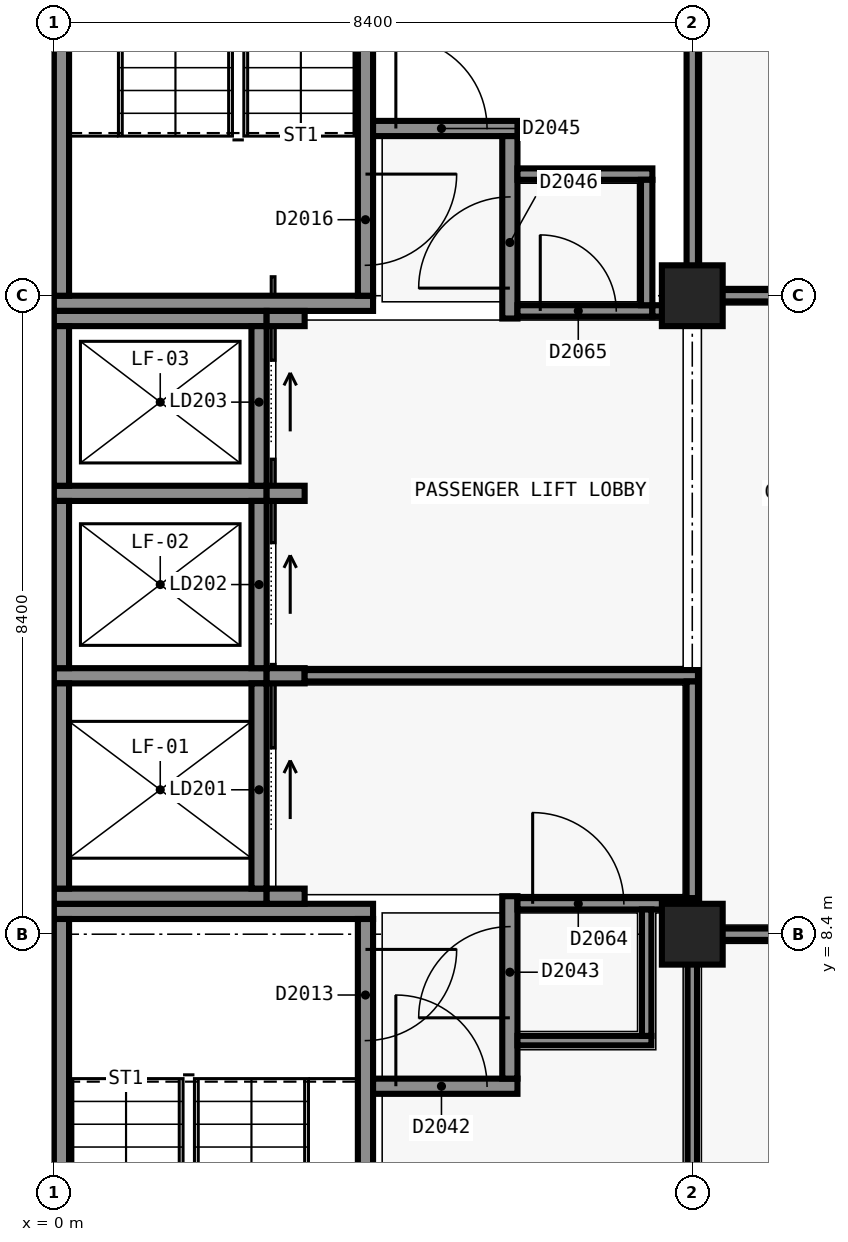
"""IFC4 building model, lengths in metres.
Left out: names, types, materials, properties, quantities, classifications, styles, units other than length and angle.
Written with IfcOpenShell. Run it as: python <this file> out.ifc"""

import sys

from ifc_helpers import new_model, si_unit, direction, frame, frame_2d, origin, origin_2d, place, context, subcontext, project, spatial, rectangle, extrude, element, fill, save


model = new_model("IFC4")
c1 = context("Model", 3, precision=1e-05, world=origin(), true_north=direction((0.0, 1.0)))
c2 = subcontext(c1, "Body", "Model", "MODEL_VIEW")
j1 = project(units=[si_unit("LENGTHUNIT", "METRE"), si_unit("PLANEANGLEUNIT", "RADIAN")], contexts=[c1])
p1 = place(None, origin())
s1 = spatial("IfcSite", under=j1, at=p1, CompositionType="ELEMENT")
p2 = place(p1, origin())
s2 = spatial("IfcBuilding", under=s1, at=p2, CompositionType="ELEMENT")
p3 = place(p2, frame((0.0, 0.0, 10.2)))
s3 = spatial("IfcBuildingStorey", under=s2, at=p3, CompositionType="ELEMENT", Elevation=10.2)
p4 = place(p3, frame((0.0, 8.7, 0.0), z_axis=(0.0, 0.0, 1.0), x_axis=(1.0, 0.0, 0.0)))
e1 = element("IfcWall", 1, at=p4, inside=s3, PredefinedType="SHEAR", context=c2, shape_type="SweptSolid", body=[
    extrude(rectangle(XDim=4.199, YDim=0.2, at=frame_2d((2.1, 0.0))), origin(), (0.0, 0.0, 1.0), 4.8),
])
p5 = place(p3, frame((0.1, 0.2, 0.0), z_axis=(0.0, 0.0, 1.0), x_axis=(0.0, 1.0, 0.0)))
e2 = element("IfcWall", 2, at=p5, inside=s3, PredefinedType="SHEAR", context=c2, shape_type="SweptSolid", body=[
    extrude(rectangle(XDim=8.4, YDim=0.2, at=frame_2d((4.2, 0.0))), origin(), (0.0, 0.0, 1.0), 4.8),
])
p6 = place(p3, frame((4.1, 8.6, 0.0), z_axis=(0.0, 0.0, 1.0), x_axis=(0.0, -1.0, 0.0)))
e3 = element("IfcWall", 3, at=p6, inside=s3, PredefinedType="SHEAR", context=c2, shape_type="SweptSolid", body=[
    extrude(rectangle(XDim=8.4, YDim=0.2, at=frame_2d((4.2, 0.0))), origin(), (0.0, 0.0, 1.0), 4.8),
])
p7 = place(p6, frame((0.4, 0.0, 0.0)))
e4 = element("IfcOpeningElement", 4, at=p7, cuts=e3, PredefinedType="OPENING", context=c2, shape_type="SweptSolid", body=[
    extrude(rectangle(XDim=1.2, YDim=2.1, at=frame_2d((0.6, 1.05))), frame((0.0, 0.11, 0.0), z_axis=(0.0, -1.0, 0.0), x_axis=(1.0, 0.0, 0.0)), (0.0, 0.0, 1.0), 0.22),
])
p8 = place(p3, frame((4.2, 16.7, 0.0), z_axis=(0.0, 0.0, 1.0), x_axis=(-1.0, 0.0, 0.0)))
e5 = element("IfcWall", 5, at=p8, inside=s3, PredefinedType="SHEAR", context=c2, shape_type="SweptSolid", body=[
    extrude(rectangle(XDim=4.199, YDim=0.2, at=frame_2d((2.1, 0.0))), origin(), (0.0, 0.0, 1.0), 4.8),
])
p9 = place(p3, frame((0.1, 16.8, 0.0), z_axis=(0.0, 0.0, 1.0), x_axis=(0.0, 1.0, 0.0)))
e6 = element("IfcWall", 6, at=p9, inside=s3, PredefinedType="SHEAR", context=c2, shape_type="SweptSolid", body=[
    extrude(rectangle(XDim=8.2, YDim=0.2, at=frame_2d((4.1, 0.0))), origin(), (0.0, 0.0, 1.0), 4.8),
])
p10 = place(p3, frame((4.1, 25.0, 0.0), z_axis=(0.0, 0.0, 1.0), x_axis=(0.0, -1.0, 0.0)))
e7 = element("IfcWall", 7, at=p10, inside=s3, PredefinedType="SHEAR", context=c2, shape_type="SweptSolid", body=[
    extrude(rectangle(XDim=8.2, YDim=0.2, at=frame_2d((4.1, 0.0))), origin(), (0.0, 0.0, 1.0), 4.8),
])
p11 = place(p10, frame((6.6, 0.0, 0.0)))
e8 = element("IfcOpeningElement", 8, at=p11, cuts=e7, PredefinedType="OPENING", context=c2, shape_type="SweptSolid", body=[
    extrude(rectangle(XDim=1.2, YDim=2.1, at=frame_2d((0.6, 1.05))), frame((0.0, 0.11, 0.0), z_axis=(0.0, -1.0, 0.0), x_axis=(1.0, 0.0, 0.0)), (0.0, 0.0, 1.0), 0.22),
])
for number, where, z_axis, x_axis in (
    (9, (2.8, 8.9, 0.0), (0.0, 0.0, 1.0), (-1.0, 0.0, 0.0)),
    (10, (0.0, 11.8, 0.0), (0.0, 0.0, 1.0), (1.0, 0.0, 0.0)),
):
    element("IfcWall", number, at=place(p3, frame(where, z_axis=z_axis, x_axis=x_axis)), inside=s3, PredefinedType="SHEAR", context=c2, shape_type="SweptSolid", body=[
        extrude(rectangle(XDim=2.8, YDim=0.2, at=frame_2d((1.4, 0.0))), origin(), (0.0, 0.0, 1.0), 4.8),
    ])
p12 = place(p3, frame((0.1, 9.0, 0.0), z_axis=(0.0, 0.0, 1.0), x_axis=(0.0, 1.0, 0.0)))
e11 = element("IfcWall", 11, at=p12, inside=s3, PredefinedType="SHEAR", context=c2, shape_type="SweptSolid", body=[
    extrude(rectangle(XDim=2.7, YDim=0.2, at=frame_2d((1.35, 0.0))), origin(), (0.0, 0.0, 1.0), 4.8),
])
p13 = place(p3, frame((2.7, 11.7, 0.0), z_axis=(0.0, 0.0, 1.0), x_axis=(0.0, -1.0, 0.0)))
e12 = element("IfcWall", 12, at=p13, inside=s3, PredefinedType="SHEAR", context=c2, shape_type="SweptSolid", body=[
    extrude(rectangle(XDim=2.7, YDim=0.2, at=frame_2d((1.35, 0.0))), origin(), (0.0, 0.0, 1.0), 4.8),
])
p14 = place(p13, frame((0.85, 0.0, 0.0)))
e13 = element("IfcOpeningElement", 13, at=p14, cuts=e12, PredefinedType="OPENING", context=c2, shape_type="SweptSolid", body=[
    extrude(rectangle(XDim=1.1, YDim=2.1, at=frame_2d((0.55, 1.05))), frame((0.0, 0.11, 0.0), z_axis=(0.0, -1.0, 0.0), x_axis=(1.0, 0.0, 0.0)), (0.0, 0.0, 1.0), 0.22),
])
p15 = place(p3, frame((0.0, 14.2, 0.0), z_axis=(0.0, 0.0, 1.0), x_axis=(1.0, 0.0, 0.0)))
e14 = element("IfcWall", 14, at=p15, inside=s3, PredefinedType="SHEAR", context=c2, shape_type="SweptSolid", body=[
    extrude(rectangle(XDim=2.8, YDim=0.2, at=frame_2d((1.4, 0.0))), origin(), (0.0, 0.0, 1.0), 4.8),
])
p16 = place(p3, frame((0.1, 11.9, 0.0), z_axis=(0.0, 0.0, 1.0), x_axis=(0.0, 1.0, 0.0)))
e15 = element("IfcWall", 15, at=p16, inside=s3, PredefinedType="SHEAR", context=c2, shape_type="SweptSolid", body=[
    extrude(rectangle(XDim=2.2, YDim=0.2, at=frame_2d((1.1, 0.0))), origin(), (0.0, 0.0, 1.0), 4.8),
])
p17 = place(p3, frame((2.7, 14.1, 0.0), z_axis=(0.0, 0.0, 1.0), x_axis=(0.0, -1.0, 0.0)))
e16 = element("IfcWall", 16, at=p17, inside=s3, PredefinedType="SHEAR", context=c2, shape_type="SweptSolid", body=[
    extrude(rectangle(XDim=2.2, YDim=0.2, at=frame_2d((1.1, 0.0))), origin(), (0.0, 0.0, 1.0), 4.8),
])
p18 = place(p17, frame((0.55, 0.0, 0.0)))
e17 = element("IfcOpeningElement", 17, at=p18, cuts=e16, PredefinedType="OPENING", context=c2, shape_type="SweptSolid", body=[
    extrude(rectangle(XDim=1.1, YDim=2.1, at=frame_2d((0.55, 1.05))), frame((0.0, 0.11, 0.0), z_axis=(0.0, -1.0, 0.0), x_axis=(1.0, 0.0, 0.0)), (0.0, 0.0, 1.0), 0.22),
])
p19 = place(p3, frame((0.0, 16.5, 0.0), z_axis=(0.0, 0.0, 1.0), x_axis=(1.0, 0.0, 0.0)))
e18 = element("IfcWall", 18, at=p19, inside=s3, PredefinedType="SHEAR", context=c2, shape_type="SweptSolid", body=[
    extrude(rectangle(XDim=2.8, YDim=0.2, at=frame_2d((1.4, 0.0))), origin(), (0.0, 0.0, 1.0), 4.8),
])
p20 = place(p3, frame((0.1, 14.3, 0.0), z_axis=(0.0, 0.0, 1.0), x_axis=(0.0, 1.0, 0.0)))
e19 = element("IfcWall", 19, at=p20, inside=s3, PredefinedType="SHEAR", context=c2, shape_type="SweptSolid", body=[
    extrude(rectangle(XDim=2.1, YDim=0.2, at=frame_2d((1.05, 0.0))), origin(), (0.0, 0.0, 1.0), 4.8),
])
p21 = place(p3, frame((2.7, 16.4, 0.0), z_axis=(0.0, 0.0, 1.0), x_axis=(0.0, -1.0, 0.0)))
e20 = element("IfcWall", 20, at=p21, inside=s3, PredefinedType="SHEAR", context=c2, shape_type="SweptSolid", body=[
    extrude(rectangle(XDim=2.1, YDim=0.2, at=frame_2d((1.05, 0.0))), origin(), (0.0, 0.0, 1.0), 4.8),
])
p22 = place(p21, frame((0.45, 0.0, 0.0)))
e21 = element("IfcOpeningElement", 21, at=p22, cuts=e20, PredefinedType="OPENING", context=c2, shape_type="SweptSolid", body=[
    extrude(rectangle(XDim=1.1, YDim=2.1, at=frame_2d((0.55, 1.05))), frame((0.0, 0.11, 0.0), z_axis=(0.0, -1.0, 0.0), x_axis=(1.0, 0.0, 0.0)), (0.0, 0.0, 1.0), 0.22),
])
for number, where, z_axis, x_axis in (
    (22, (8.4, 8.4, 0.0), (0.0, 0.0, 1.0), (1.0, 0.0, 0.0)),
    (23, (8.4, 16.8, 0.0), (0.0, 0.0, 1.0), (1.0, 0.0, 0.0)),
):
    element("IfcColumn", number, at=place(p3, frame(where, z_axis=z_axis, x_axis=x_axis)), inside=s3, PredefinedType="COLUMN", context=c2, shape_type="SweptSolid", body=[
        extrude(rectangle(XDim=0.8, YDim=0.8, at=origin_2d()), origin(), (0.0, 0.0, 1.0), 4.8),
    ])
for number, where, z_axis, x_axis in (
    (24, (3.3, 8.9, 0.0), (0.0, 0.0, 1.0), (-1.0, 0.0, 0.0)),
    (25, (2.8, 11.8, 0.0), (0.0, 0.0, 1.0), (1.0, 0.0, 0.0)),
    (26, (2.8, 14.2, 0.0), (0.0, 0.0, 1.0), (1.0, 0.0, 0.0)),
    (27, (2.8, 16.5, 0.0), (0.0, 0.0, 1.0), (1.0, 0.0, 0.0)),
):
    element("IfcWall", number, at=place(p3, frame(where, z_axis=z_axis, x_axis=x_axis)), inside=s3, PredefinedType="SHEAR", context=c2, shape_type="SweptSolid", body=[
        extrude(rectangle(XDim=0.5, YDim=0.2, at=frame_2d((0.25, 0.0))), origin(), (0.0, 0.0, 1.0), 4.8),
    ])
p23 = place(p3, frame((4.2, 6.4, 0.0), z_axis=(0.0, 0.0, 1.0), x_axis=(1.0, 0.0, 0.0)))
e28 = element("IfcWall", 28, at=p23, inside=s3, PredefinedType="SOLIDWALL", context=c2, shape_type="SweptSolid", body=[
    extrude(rectangle(XDim=1.9, YDim=0.2, at=frame_2d((0.95, 0.0))), origin(), (0.0, 0.0, 1.0), 4.5),
])
p24 = place(p23, frame((0.3, 0.0, 0.0)))
e29 = element("IfcOpeningElement", 29, at=p24, cuts=e28, PredefinedType="OPENING", context=c2, shape_type="SweptSolid", body=[
    extrude(rectangle(XDim=1.2, YDim=2.1, at=frame_2d((0.6, 1.05))), frame((0.0, 0.11, 0.0), z_axis=(0.0, -1.0, 0.0), x_axis=(1.0, 0.0, 0.0)), (0.0, 0.0, 1.0), 0.22),
])
p25 = place(p3, frame((4.2, 19.0, 0.0), z_axis=(0.0, 0.0, 1.0), x_axis=(1.0, 0.0, 0.0)))
e30 = element("IfcWall", 30, at=p25, inside=s3, PredefinedType="SOLIDWALL", context=c2, shape_type="SweptSolid", body=[
    extrude(rectangle(XDim=1.9, YDim=0.2, at=frame_2d((0.95, 0.0))), origin(), (0.0, 0.0, 1.0), 4.5),
])
p26 = place(p25, frame((0.3, 0.0, 0.0)))
e31 = element("IfcOpeningElement", 31, at=p26, cuts=e30, PredefinedType="OPENING", context=c2, shape_type="SweptSolid", body=[
    extrude(rectangle(XDim=1.2, YDim=2.1, at=frame_2d((0.6, 1.05))), frame((0.0, 0.11, 0.0), z_axis=(0.0, -1.0, 0.0), x_axis=(1.0, 0.0, 0.0)), (0.0, 0.0, 1.0), 0.22),
])
p27 = place(p3, frame((6.0, 6.5, 0.0), z_axis=(0.0, 0.0, 1.0), x_axis=(0.0, 1.0, 0.0)))
e32 = element("IfcWall", 32, at=p27, inside=s3, PredefinedType="SOLIDWALL", context=c2, shape_type="SweptSolid", body=[
    extrude(rectangle(XDim=2.4, YDim=0.2, at=frame_2d((1.2, 0.0))), origin(), (0.0, 0.0, 1.0), 4.0),
])
p28 = place(p27, frame((0.8, 0.0, 0.0)))
e33 = element("IfcOpeningElement", 33, at=p28, cuts=e32, PredefinedType="OPENING", context=c2, shape_type="SweptSolid", body=[
    extrude(rectangle(XDim=1.2, YDim=2.1, at=frame_2d((0.6, 1.05))), frame((0.0, 0.11, 0.0), z_axis=(0.0, -1.0, 0.0), x_axis=(1.0, 0.0, 0.0)), (0.0, 0.0, 1.0), 0.22),
])
p29 = place(p3, frame((6.0, 16.5, 0.0), z_axis=(0.0, 0.0, 1.0), x_axis=(0.0, 1.0, 0.0)))
e34 = element("IfcWall", 34, at=p29, inside=s3, PredefinedType="SOLIDWALL", context=c2, shape_type="SweptSolid", body=[
    extrude(rectangle(XDim=2.4, YDim=0.2, at=frame_2d((1.2, 0.0))), origin(), (0.0, 0.0, 1.0), 4.0),
])
p30 = place(p29, frame((0.4, 0.0, 0.0)))
e35 = element("IfcOpeningElement", 35, at=p30, cuts=e34, PredefinedType="OPENING", context=c2, shape_type="SweptSolid", body=[
    extrude(rectangle(XDim=1.2, YDim=2.1, at=frame_2d((0.6, 1.05))), frame((0.0, 0.11, 0.0), z_axis=(0.0, -1.0, 0.0), x_axis=(1.0, 0.0, 0.0)), (0.0, 0.0, 1.0), 0.22),
])
p31 = place(p3, frame((8.325, 8.4, 0.0), z_axis=(0.0, 0.0, 1.0), x_axis=(1.0, 0.0, 0.0)))
e36 = element("IfcWall", 36, at=p31, inside=s3, PredefinedType="PARTITIONING", context=c2, shape_type="SweptSolid", body=[
    extrude(rectangle(XDim=4.35, YDim=0.15, at=frame_2d((2.175, 0.0))), origin(), (0.0, 0.0, 1.0), 3.8),
])
p32 = place(p31, frame((1.675, 0.0, 0.0)))
e37 = element("IfcOpeningElement", 37, at=p32, cuts=e36, PredefinedType="OPENING", context=c2, shape_type="SweptSolid", body=[
    extrude(rectangle(XDim=1.0, YDim=2.1, at=frame_2d((0.5, 1.05))), frame((0.0, 0.085, 0.0), z_axis=(0.0, -1.0, 0.0), x_axis=(1.0, 0.0, 0.0)), (0.0, 0.0, 1.0), 0.17),
])
p33 = place(p3, frame((6.1, 16.6, 0.0), z_axis=(0.0, 0.0, 1.0), x_axis=(1.0, 0.0, 0.0)))
e38 = element("IfcWall", 38, at=p33, inside=s3, PredefinedType="PARTITIONING", context=c2, shape_type="SweptSolid", body=[
    extrude(rectangle(XDim=1.775, YDim=0.15, at=frame_2d((0.887, 0.0))), origin(), (0.0, 0.0, 1.0), 4.0),
])
p34 = place(p33, frame((0.3, 0.0, 0.0)))
e39 = element("IfcOpeningElement", 39, at=p34, cuts=e38, PredefinedType="OPENING", context=c2, shape_type="SweptSolid", body=[
    extrude(rectangle(XDim=1.0, YDim=2.1, at=frame_2d((0.5, 1.05))), frame((0.0, 0.085, 0.0), z_axis=(0.0, -1.0, 0.0), x_axis=(1.0, 0.0, 0.0)), (0.0, 0.0, 1.0), 0.17),
])
p35 = place(p3, frame((8.325, 16.8, 0.0), z_axis=(0.0, 0.0, 1.0), x_axis=(1.0, 0.0, 0.0)))
e40 = element("IfcWall", 40, at=p35, inside=s3, PredefinedType="PARTITIONING", context=c2, shape_type="SweptSolid", body=[
    extrude(rectangle(XDim=4.35, YDim=0.15, at=frame_2d((2.175, 0.0))), origin(), (0.0, 0.0, 1.0), 3.8),
])
p36 = place(p3, frame((6.1, 8.8, 0.0), z_axis=(0.0, 0.0, 1.0), x_axis=(1.0, 0.0, 0.0)))
e41 = element("IfcWall", 41, at=p36, inside=s3, PredefinedType="SOLIDWALL", context=c2, shape_type="SweptSolid", body=[
    extrude(rectangle(XDim=2.375, YDim=0.15, at=frame_2d((1.188, 0.0))), origin(), (0.0, 0.0, 1.0), 3.8),
])
p37 = place(p36, frame((0.2, 0.0, 0.0)))
e42 = element("IfcOpeningElement", 42, at=p37, cuts=e41, PredefinedType="OPENING", context=c2, shape_type="SweptSolid", body=[
    extrude(rectangle(XDim=1.2, YDim=2.1, at=frame_2d((0.6, 1.05))), frame((0.0, 0.085, 0.0), z_axis=(0.0, -1.0, 0.0), x_axis=(1.0, 0.0, 0.0)), (0.0, 0.0, 1.0), 0.17),
])
p38 = place(p3, frame((3.3, 11.8, 0.0), z_axis=(0.0, 0.0, 1.0), x_axis=(1.0, 0.0, 0.0)))
e43 = element("IfcWall", 43, at=p38, inside=s3, PredefinedType="SOLIDWALL", context=c2, shape_type="SweptSolid", body=[
    extrude(rectangle(XDim=5.175, YDim=0.15, at=frame_2d((2.587, 0.0))), origin(), (0.0, 0.0, 1.0), 3.8),
])
p39 = place(p3, frame((7.875, 16.6, 0.0), z_axis=(0.0, 0.0, 1.0), x_axis=(1.0, 0.0, 0.0)))
e44 = element("IfcWall", 44, at=p39, inside=s3, PredefinedType="SOLIDWALL", context=c2, shape_type="SweptSolid", body=[
    extrude(rectangle(XDim=0.6, YDim=0.15, at=frame_2d((0.3, 0.0))), origin(), (0.0, 0.0, 1.0), 3.8),
])
p40 = place(p3, frame((6.1, 18.4, 0.0), z_axis=(0.0, 0.0, 1.0), x_axis=(1.0, 0.0, 0.0)))
e45 = element("IfcWall", 45, at=p40, inside=s3, PredefinedType="SOLIDWALL", context=c2, shape_type="SweptSolid", body=[
    extrude(rectangle(XDim=1.775, YDim=0.15, at=frame_2d((0.887, 0.0))), origin(), (0.0, 0.0, 1.0), 4.5),
])
p41 = place(p3, frame((8.4, 8.475, 0.0), z_axis=(0.0, 0.0, 1.0), x_axis=(0.0, 1.0, 0.0)))
e46 = element("IfcWall", 46, at=p41, inside=s3, PredefinedType="PARTITIONING", context=c2, shape_type="SweptSolid", body=[
    extrude(rectangle(XDim=0.25, YDim=0.15, at=frame_2d((0.125, 0.0))), origin(), (0.0, 0.0, 1.0), 3.8),
])
p42 = place(p3, frame((8.4, 8.875, 0.0), z_axis=(0.0, 0.0, 1.0), x_axis=(0.0, 1.0, 0.0)))
e47 = element("IfcWall", 47, at=p42, inside=s3, PredefinedType="SOLIDWALL", context=c2, shape_type="SweptSolid", body=[
    extrude(rectangle(XDim=2.85, YDim=0.15, at=frame_2d((1.425, 0.0))), origin(), (0.0, 0.0, 1.0), 3.8),
])
p43 = place(p3, frame((7.8, 16.675, 0.0), z_axis=(0.0, 0.0, 1.0), x_axis=(0.0, 1.0, 0.0)))
e48 = element("IfcWall", 48, at=p43, inside=s3, PredefinedType="SOLIDWALL", context=c2, shape_type="SweptSolid", body=[
    extrude(rectangle(XDim=1.65, YDim=0.15, at=frame_2d((0.825, 0.0))), origin(), (0.0, 0.0, 1.0), 4.0),
])
p44 = place(p3, frame((8.4, 16.875, 0.0), z_axis=(0.0, 0.0, 1.0), x_axis=(0.0, 1.0, 0.0)))
e49 = element("IfcWall", 49, at=p44, inside=s3, PredefinedType="SOLIDWALL", context=c2, shape_type="SweptSolid", body=[
    extrude(rectangle(XDim=7.575, YDim=0.15, at=frame_2d((3.788, 0.0))), origin(), (0.0, 0.0, 1.0), 3.8),
])
p45 = place(p3, frame((6.1, 7.0, 0.0), z_axis=(0.0, 0.0, 1.0), x_axis=(1.0, 0.0, 0.0)))
e50 = element("IfcWall", 50, at=p45, inside=s3, PredefinedType="PARTITIONING", context=c2, shape_type="SweptSolid", body=[
    extrude(rectangle(XDim=1.762, YDim=0.125, at=frame_2d((0.881, 0.0))), origin(), (0.0, 0.0, 1.0), 4.5),
])
p46 = place(p3, frame((7.8, 7.062, 0.0), z_axis=(0.0, 0.0, 1.0), x_axis=(0.0, 1.0, 0.0)))
e51 = element("IfcWall", 51, at=p46, inside=s3, PredefinedType="PARTITIONING", context=c2, shape_type="SweptSolid", body=[
    extrude(rectangle(XDim=1.663, YDim=0.125, at=frame_2d((0.831, 0.0))), origin(), (0.0, 0.0, 1.0), 4.0),
])
p47 = place(p3, frame((8.4, 0.75, 0.0), z_axis=(0.0, 0.0, 1.0), x_axis=(0.0, 1.0, 0.0)))
e52 = element("IfcWall", 52, at=p47, inside=s3, PredefinedType="PARTITIONING", context=c2, shape_type="SweptSolid", body=[
    extrude(rectangle(XDim=7.575, YDim=0.125, at=frame_2d((3.788, 0.0))), origin(), (0.0, 0.0, 1.0), 3.8),
])
p48 = place(p14, origin())
e53 = element("IfcDoor", 53, at=p48, inside=s3, OperationType="SLIDING_TO_LEFT", PredefinedType="DOOR", context=c2, shape_type="SweptSolid", body=[
    extrude(rectangle(XDim=1.1, YDim=2.1, at=frame_2d((0.55, 1.05))), frame((0.0, 0.025, 0.0), z_axis=(0.0, -1.0, 0.0), x_axis=(1.0, 0.0, 0.0)), (0.0, 0.0, 1.0), 0.05),
])
fill(e13, e53)
p49 = place(p18, origin())
e54 = element("IfcDoor", 54, at=p49, inside=s3, OperationType="SLIDING_TO_LEFT", PredefinedType="DOOR", context=c2, shape_type="SweptSolid", body=[
    extrude(rectangle(XDim=1.1, YDim=2.1, at=frame_2d((0.55, 1.05))), frame((0.0, 0.025, 0.0), z_axis=(0.0, -1.0, 0.0), x_axis=(1.0, 0.0, 0.0)), (0.0, 0.0, 1.0), 0.05),
])
fill(e17, e54)
p50 = place(p22, origin())
e55 = element("IfcDoor", 55, at=p50, inside=s3, OperationType="SLIDING_TO_LEFT", PredefinedType="DOOR", context=c2, shape_type="SweptSolid", body=[
    extrude(rectangle(XDim=1.1, YDim=2.1, at=frame_2d((0.55, 1.05))), frame((0.0, 0.025, 0.0), z_axis=(0.0, -1.0, 0.0), x_axis=(1.0, 0.0, 0.0)), (0.0, 0.0, 1.0), 0.05),
])
fill(e21, e55)
p51 = place(p7, origin())
e56 = element("IfcDoor", 56, at=p51, inside=s3, OperationType="SINGLE_SWING_RIGHT", PredefinedType="DOOR", context=c2, shape_type="SweptSolid", body=[
    extrude(rectangle(XDim=1.2, YDim=2.1, at=frame_2d((0.6, 1.05))), frame((0.0, 0.025, 0.0), z_axis=(0.0, -1.0, 0.0), x_axis=(1.0, 0.0, 0.0)), (0.0, 0.0, 1.0), 0.05),
])
fill(e4, e56)
p52 = place(p11, origin())
e57 = element("IfcDoor", 57, at=p52, inside=s3, OperationType="SINGLE_SWING_RIGHT", PredefinedType="DOOR", context=c2, shape_type="SweptSolid", body=[
    extrude(rectangle(XDim=1.2, YDim=2.1, at=frame_2d((0.6, 1.05))), frame((0.0, 0.025, 0.0), z_axis=(0.0, -1.0, 0.0), x_axis=(1.0, 0.0, 0.0)), (0.0, 0.0, 1.0), 0.05),
])
fill(e8, e57)
p53 = place(p24, origin())
e58 = element("IfcDoor", 58, at=p53, inside=s3, OperationType="SINGLE_SWING_LEFT", PredefinedType="DOOR", context=c2, shape_type="SweptSolid", body=[
    extrude(rectangle(XDim=1.2, YDim=2.1, at=frame_2d((0.6, 1.05))), frame((0.0, 0.025, 0.0), z_axis=(0.0, -1.0, 0.0), x_axis=(1.0, 0.0, 0.0)), (0.0, 0.0, 1.0), 0.05),
])
fill(e29, e58)
p54 = place(p28, origin())
e59 = element("IfcDoor", 59, at=p54, inside=s3, OperationType="SINGLE_SWING_RIGHT", PredefinedType="DOOR", context=c2, shape_type="SweptSolid", body=[
    extrude(rectangle(XDim=1.2, YDim=2.1, at=frame_2d((0.6, 1.05))), frame((0.0, 0.025, 0.0), z_axis=(0.0, -1.0, 0.0), x_axis=(1.0, 0.0, 0.0)), (0.0, 0.0, 1.0), 0.05),
])
fill(e33, e59)
p55 = place(p26, origin())
e60 = element("IfcDoor", 60, at=p55, inside=s3, OperationType="SINGLE_SWING_LEFT", PredefinedType="DOOR", context=c2, shape_type="SweptSolid", body=[
    extrude(rectangle(XDim=1.2, YDim=2.1, at=frame_2d((0.6, 1.05))), frame((0.0, 0.025, 0.0), z_axis=(0.0, -1.0, 0.0), x_axis=(1.0, 0.0, 0.0)), (0.0, 0.0, 1.0), 0.05),
])
fill(e31, e60)
p56 = place(p30, origin())
e61 = element("IfcDoor", 61, at=p56, inside=s3, OperationType="SINGLE_SWING_RIGHT", PredefinedType="DOOR", context=c2, shape_type="SweptSolid", body=[
    extrude(rectangle(XDim=1.2, YDim=2.1, at=frame_2d((0.6, 1.05))), frame((0.0, 0.025, 0.0), z_axis=(0.0, -1.0, 0.0), x_axis=(1.0, 0.0, 0.0)), (0.0, 0.0, 1.0), 0.05),
])
fill(e35, e61)
p57 = place(p37, origin())
e62 = element("IfcDoor", 62, at=p57, inside=s3, OperationType="SINGLE_SWING_RIGHT", PredefinedType="DOOR", context=c2, shape_type="SweptSolid", body=[
    extrude(rectangle(XDim=1.2, YDim=2.1, at=frame_2d((0.6, 1.05))), frame((0.0, 0.025, 0.0), z_axis=(0.0, -1.0, 0.0), x_axis=(1.0, 0.0, 0.0)), (0.0, 0.0, 1.0), 0.05),
])
fill(e42, e62)
p58 = place(p34, origin())
e63 = element("IfcDoor", 63, at=p58, inside=s3, OperationType="SINGLE_SWING_RIGHT", PredefinedType="DOOR", context=c2, shape_type="SweptSolid", body=[
    extrude(rectangle(XDim=1.0, YDim=2.1, at=frame_2d((0.5, 1.05))), frame((0.0, 0.025, 0.0), z_axis=(0.0, -1.0, 0.0), x_axis=(1.0, 0.0, 0.0)), (0.0, 0.0, 1.0), 0.05),
])
fill(e39, e63)
save(model, sys.argv[1])
